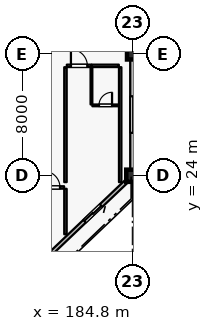
"""IFC4 building model, lengths in metres.
Left out: names, types, materials, properties, quantities, classifications, styles, units other than length and angle.
Written with IfcOpenShell. Run it as: python <this file> out.ifc"""

import sys

from ifc_helpers import new_model, si_unit, direction, frame, frame_2d, origin, origin_2d, place, context, subcontext, project, spatial, rectangle, extrude, element, fill, save


model = new_model("IFC4")
c1 = context("Model", 3, precision=1e-05, world=origin(), true_north=direction((0.0, 1.0)))
c2 = subcontext(c1, "Body", "Model", "MODEL_VIEW")
j1 = project(units=[si_unit("LENGTHUNIT", "METRE"), si_unit("PLANEANGLEUNIT", "RADIAN")], contexts=[c1])
p1 = place(None, origin())
s1 = spatial("IfcSite", under=j1, at=p1, CompositionType="ELEMENT")
p2 = place(p1, origin())
s2 = spatial("IfcBuilding", under=s1, at=p2, CompositionType="ELEMENT")
p3 = place(p2, frame((0.0, 0.0, 25.2)))
s3 = spatial("IfcBuildingStorey", under=s2, at=p3, CompositionType="ELEMENT", Elevation=25.2)
p4 = place(p3, frame((184.8, 24.0, 0.0), z_axis=(0.0, 0.0, 1.0), x_axis=(1.0, 0.0, 0.0)))
e1 = element("IfcColumn", 1, at=p4, inside=s3, PredefinedType="COLUMN", context=c2, shape_type="SweptSolid", body=[
    extrude(rectangle(XDim=0.8, YDim=0.8, at=origin_2d()), origin(), (0.0, 0.0, 1.0), 3.6),
])
p5 = place(p3, frame((184.8, 32.0, 0.0), z_axis=(0.0, 0.0, 1.0), x_axis=(1.0, 0.0, 0.0)))
e2 = element("IfcColumn", 2, at=p5, inside=s3, PredefinedType="COLUMN", context=c2, shape_type="SweptSolid", body=[
    extrude(rectangle(XDim=0.7, YDim=0.7, at=origin_2d()), origin(), (0.0, 0.0, 1.0), 3.6),
])
p6 = place(p3, frame((184.4, 23.619, 0.0), z_axis=(0.0, 0.0, 1.0), x_axis=(-0.724145676014, -0.689647040094, 0.0)))
e3 = element("IfcWall", 3, at=p6, inside=s3, PredefinedType="SOLIDWALL", context=c2, shape_type="SweptSolid", body=[
    extrude(rectangle(XDim=10.495, YDim=0.24, at=frame_2d((5.248, 0.0))), origin(), (0.0, 0.0, 1.0), 2.89),
])
p7 = place(p6, frame((2.288, 0.0, 0.0)))
e4 = element("IfcOpeningElement", 4, at=p7, cuts=e3, PredefinedType="OPENING", context=c2, shape_type="SweptSolid", body=[
    extrude(rectangle(XDim=1.5, YDim=2.25, at=frame_2d((0.75, 1.125))), frame((0.0, 0.13, 0.0), z_axis=(0.0, -1.0, 0.0), x_axis=(1.0, 0.0, 0.0)), (0.0, 0.0, 1.0), 0.26),
])
p8 = place(p6, frame((7.009, 0.0, 0.8)))
e5 = element("IfcOpeningElement", 5, at=p8, cuts=e3, PredefinedType="OPENING", context=c2, shape_type="SweptSolid", body=[
    extrude(rectangle(XDim=2.0, YDim=1.75, at=frame_2d((1.0, 0.875))), frame((0.0, 0.13, 0.0), z_axis=(0.0, -1.0, 0.0), x_axis=(1.0, 0.0, 0.0)), (0.0, 0.0, 1.0), 0.26),
])
p9 = place(p3, frame((184.8, 31.65, 0.0), z_axis=(0.0, 0.0, 1.0), x_axis=(0.0, -1.0, 0.0)))
e6 = element("IfcWall", 6, at=p9, inside=s3, PredefinedType="SOLIDWALL", context=c2, shape_type="SweptSolid", body=[
    extrude(rectangle(XDim=7.25, YDim=0.28, at=frame_2d((3.625, 0.0))), origin(), (0.0, 0.0, 1.0), 2.7),
])
p10 = place(p9, frame((2.425, 0.0, 0.5)))
e7 = element("IfcOpeningElement", 7, at=p10, cuts=e6, PredefinedType="OPENING", context=c2, shape_type="SweptSolid", body=[
    extrude(rectangle(XDim=2.4, YDim=1.65, at=frame_2d((1.2, 0.825))), frame((0.0, 0.15, 0.0), z_axis=(0.0, -1.0, 0.0), x_axis=(1.0, 0.0, 0.0)), (0.0, 0.0, 1.0), 0.3),
])
p11 = place(p3, frame((178.69, 23.23, 0.0), z_axis=(0.0, 0.0, 1.0), x_axis=(1.0, 0.0, 0.0)))
e8 = element("IfcWall", 8, at=p11, inside=s3, PredefinedType="PARTITIONING", context=c2, shape_type="SweptSolid", body=[
    extrude(rectangle(XDim=1.62, YDim=0.16, at=frame_2d((0.81, 0.0))), origin(), (0.0, 0.0, 1.0), 3.335),
])
p12 = place(p11, frame((0.27, 0.0, 0.0)))
e9 = element("IfcOpeningElement", 9, at=p12, cuts=e8, PredefinedType="OPENING", context=c2, shape_type="SweptSolid", body=[
    extrude(rectangle(XDim=1.08, YDim=2.3, at=frame_2d((0.54, 1.15))), frame((0.0, 0.09, 0.0), z_axis=(0.0, -1.0, 0.0), x_axis=(1.0, 0.0, 0.0)), (0.0, 0.0, 1.0), 0.18),
])
p13 = place(p3, frame((180.4, 20.15, 0.0), z_axis=(0.0, 0.0, 1.0), x_axis=(0.0, 1.0, 0.0)))
e10 = element("IfcWall", 10, at=p13, inside=s3, PredefinedType="PARTITIONING", context=c2, shape_type="SweptSolid", body=[
    extrude(rectangle(XDim=2.99, YDim=0.16, at=frame_2d((1.495, 0.0))), origin(), (0.0, 0.0, 1.0), 3.335),
])
p14 = place(p3, frame((180.49, 31.23, 0.0), z_axis=(0.0, 0.0, 1.0), x_axis=(1.0, 0.0, 0.0)))
e11 = element("IfcWall", 11, at=p14, inside=s3, PredefinedType="PARTITIONING", context=c2, shape_type="SweptSolid", body=[
    extrude(rectangle(XDim=1.62, YDim=0.16, at=frame_2d((0.81, 0.0))), origin(), (0.0, 0.0, 1.0), 3.335),
])
p15 = place(p14, frame((0.27, 0.0, 0.0)))
e12 = element("IfcOpeningElement", 12, at=p15, cuts=e11, PredefinedType="OPENING", context=c2, shape_type="SweptSolid", body=[
    extrude(rectangle(XDim=1.08, YDim=2.3, at=frame_2d((0.54, 1.15))), frame((0.0, 0.09, 0.0), z_axis=(0.0, -1.0, 0.0), x_axis=(1.0, 0.0, 0.0)), (0.0, 0.0, 1.0), 0.18),
])
p16 = place(p3, frame((182.12, 31.23, 0.0), z_axis=(0.0, 0.0, 1.0), x_axis=(1.0, 0.0, 0.0)))
e13 = element("IfcWall", 13, at=p16, inside=s3, PredefinedType="PARTITIONING", context=c2, shape_type="SweptSolid", body=[
    extrude(rectangle(XDim=1.79, YDim=0.16, at=frame_2d((0.895, 0.0))), origin(), (0.0, 0.0, 1.0), 3.335),
])
p17 = place(p3, frame((182.11, 28.69, 0.0), z_axis=(0.0, 0.0, 1.0), x_axis=(0.0, 1.0, 0.0)))
e14 = element("IfcWall", 14, at=p17, inside=s3, PredefinedType="PARTITIONING", context=c2, shape_type="SweptSolid", body=[
    extrude(rectangle(XDim=2.45, YDim=0.115, at=frame_2d((1.225, 0.0))), origin(), (0.0, 0.0, 1.0), 3.335),
])
p18 = place(p3, frame((182.17, 28.63, 0.0), z_axis=(0.0, 0.0, 1.0), x_axis=(1.0, 0.0, 0.0)))
e15 = element("IfcWall", 15, at=p18, inside=s3, PredefinedType="PARTITIONING", context=c2, shape_type="SweptSolid", body=[
    extrude(rectangle(XDim=1.73, YDim=0.115, at=frame_2d((0.865, 0.0))), origin(), (0.0, 0.0, 1.0), 3.335),
])
p19 = place(p18, frame((0.435, 0.0, 0.0)))
e16 = element("IfcOpeningElement", 16, at=p19, cuts=e15, PredefinedType="OPENING", context=c2, shape_type="SweptSolid", body=[
    extrude(rectangle(XDim=0.86, YDim=2.12, at=frame_2d((0.43, 1.06))), frame((0.0, 0.067, 0.0), z_axis=(0.0, -1.0, 0.0), x_axis=(1.0, 0.0, 0.0)), (0.0, 0.0, 1.0), 0.135),
])
for number, where, z_axis, x_axis in (
    (17, (180.4, 23.58, 0.0), (0.0, 0.0, 1.0), (0.0, 1.0, 0.0)),
    (18, (184.0, 23.58, 0.0), (0.0, 0.0, 1.0), (0.0, 1.0, 0.0)),
):
    element("IfcWall", number, at=place(p3, frame(where, z_axis=z_axis, x_axis=x_axis)), inside=s3, PredefinedType="PARTITIONING", context=c2, shape_type="SweptSolid", body=[
        extrude(rectangle(XDim=7.56, YDim=0.16, at=frame_2d((3.78, 0.0))), origin(), (0.0, 0.0, 1.0), 3.335),
    ])
p20 = place(p7, origin())
e19 = element("IfcDoor", 19, at=p20, inside=s3, OperationType="SLIDING_TO_LEFT", PredefinedType="DOOR", context=c2, shape_type="SweptSolid", body=[
    extrude(rectangle(XDim=1.5, YDim=2.25, at=frame_2d((0.75, 1.125))), frame((0.0, 0.025, 0.0), z_axis=(0.0, -1.0, 0.0), x_axis=(1.0, 0.0, 0.0)), (0.0, 0.0, 1.0), 0.05),
])
fill(e4, e19)
p21 = place(p10, origin())
e20 = element("IfcWindow", 20, at=p21, inside=s3, PartitioningType="DOUBLE_PANEL_VERTICAL", PredefinedType="WINDOW", context=c2, shape_type="SweptSolid", body=[
    extrude(rectangle(XDim=2.4, YDim=1.65, at=frame_2d((1.2, 0.825))), frame((0.0, 0.03, 0.0), z_axis=(0.0, -1.0, 0.0), x_axis=(1.0, 0.0, 0.0)), (0.0, 0.0, 1.0), 0.06),
])
fill(e7, e20)
p22 = place(p12, origin())
e21 = element("IfcDoor", 21, at=p22, inside=s3, OperationType="SINGLE_SWING_LEFT", PredefinedType="DOOR", context=c2, shape_type="SweptSolid", body=[
    extrude(rectangle(XDim=1.08, YDim=2.3, at=frame_2d((0.54, 1.15))), frame((0.0, 0.025, 0.0), z_axis=(0.0, -1.0, 0.0), x_axis=(1.0, 0.0, 0.0)), (0.0, 0.0, 1.0), 0.05),
])
fill(e9, e21)
p23 = place(p15, origin())
e22 = element("IfcDoor", 22, at=p23, inside=s3, OperationType="SINGLE_SWING_LEFT", PredefinedType="DOOR", context=c2, shape_type="SweptSolid", body=[
    extrude(rectangle(XDim=1.08, YDim=2.3, at=frame_2d((0.54, 1.15))), frame((0.0, 0.025, 0.0), z_axis=(0.0, -1.0, 0.0), x_axis=(1.0, 0.0, 0.0)), (0.0, 0.0, 1.0), 0.05),
])
fill(e12, e22)
p24 = place(p19, origin())
e23 = element("IfcDoor", 23, at=p24, inside=s3, OperationType="SINGLE_SWING_RIGHT", PredefinedType="DOOR", context=c2, shape_type="SweptSolid", body=[
    extrude(rectangle(XDim=0.86, YDim=2.12, at=frame_2d((0.43, 1.06))), frame((0.0, 0.025, 0.0), z_axis=(0.0, -1.0, 0.0), x_axis=(1.0, 0.0, 0.0)), (0.0, 0.0, 1.0), 0.05),
])
fill(e16, e23)
save(model, sys.argv[1])
